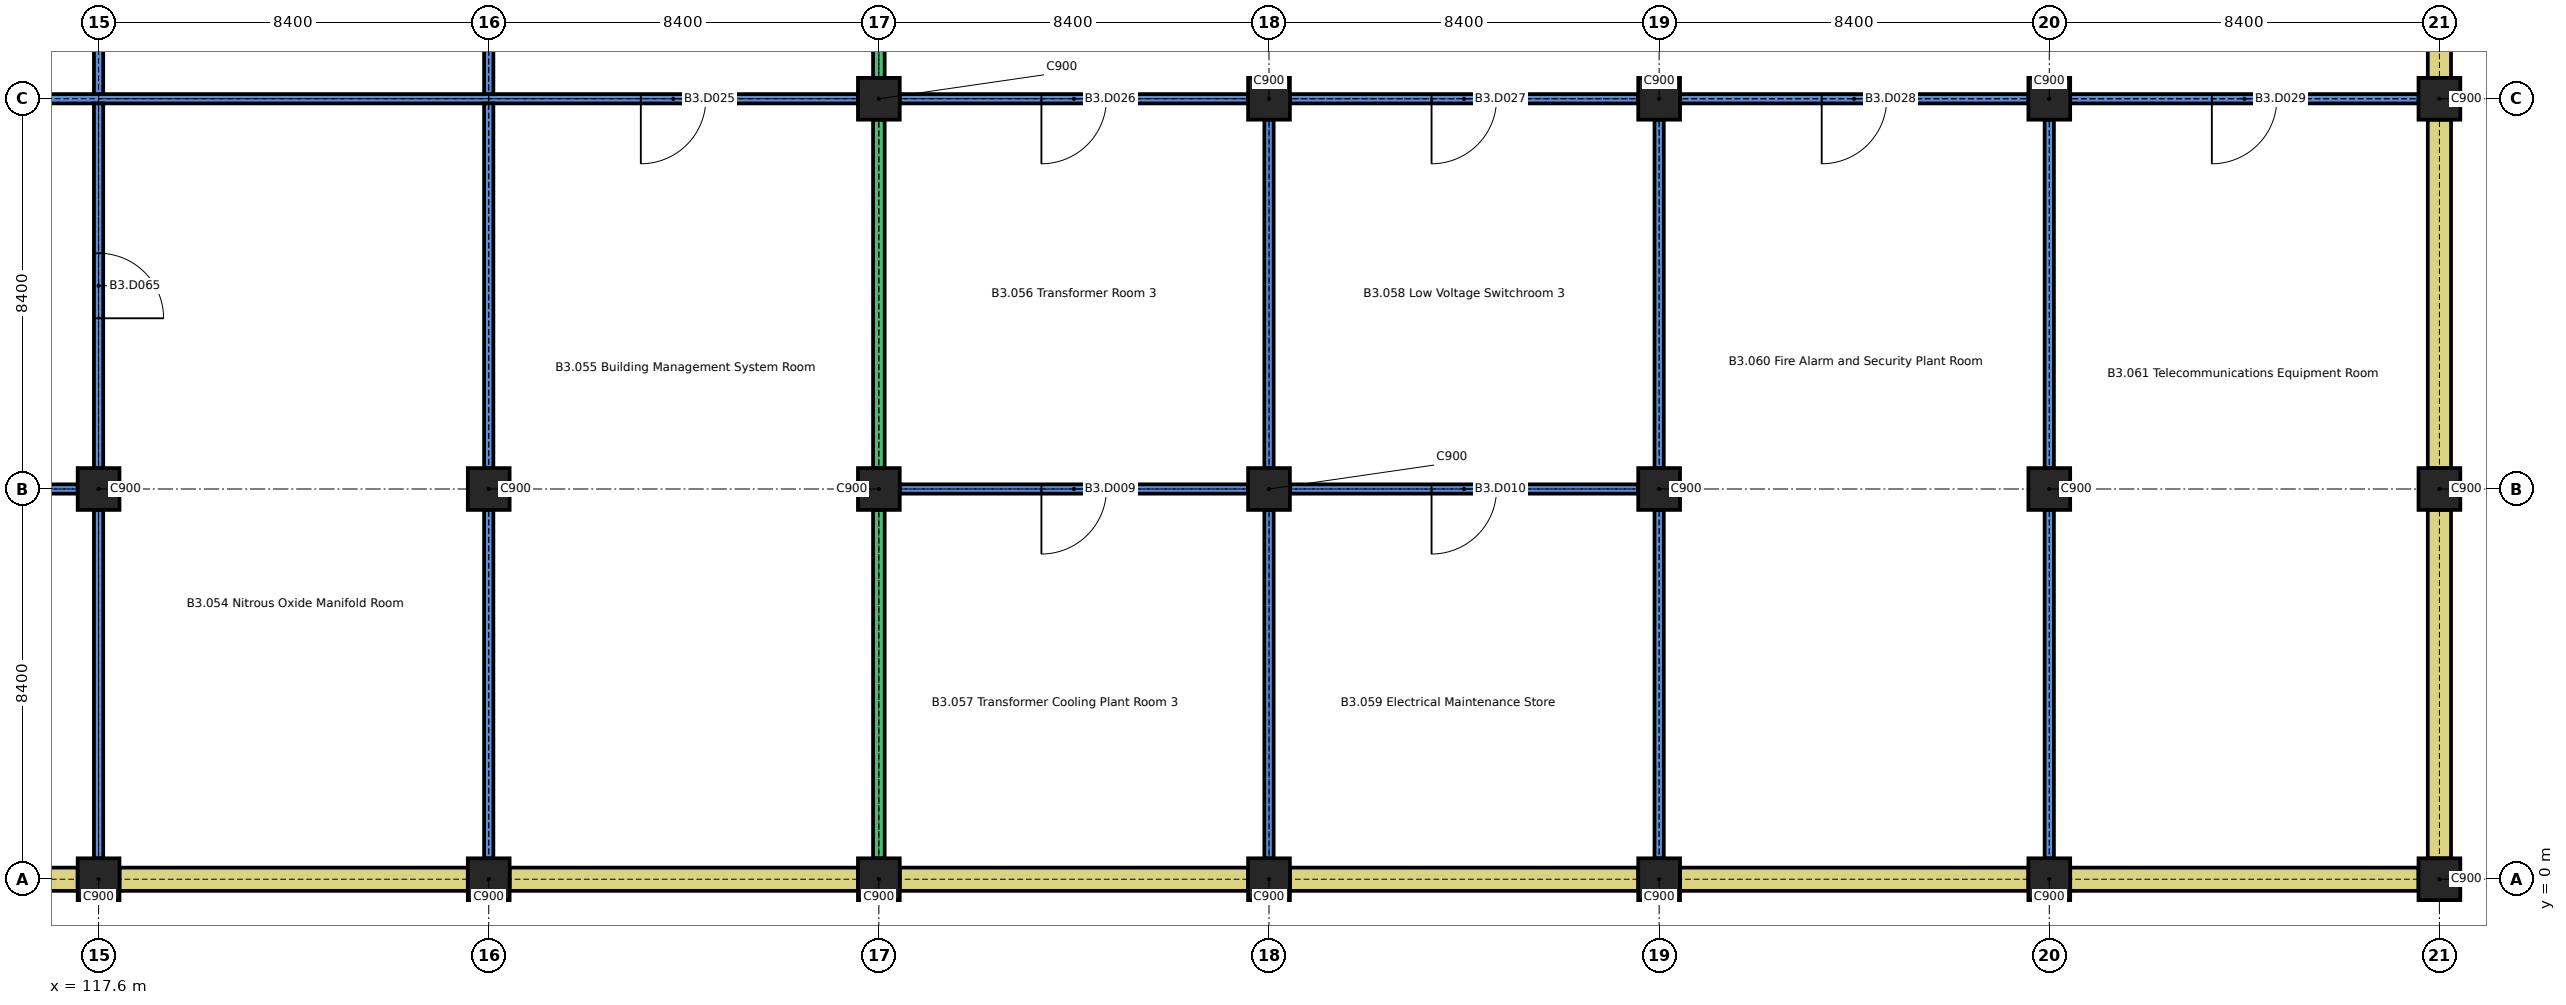
"""IFC4 building model, lengths in metres.
Left out: names, types, materials, properties, quantities, classifications, styles, units other than length and angle.
Written with IfcOpenShell. Run it as: python <this file> out.ifc"""

import sys

from ifc_helpers import new_model, si_unit, direction, frame, frame_2d, origin, origin_2d, place, context, subcontext, project, spatial, rectangle, extrude, element, fill, save


model = new_model("IFC4")
c1 = context("Model", 3, precision=1e-05, world=origin(), true_north=direction((0.0, 1.0)))
c2 = subcontext(c1, "Body", "Model", "MODEL_VIEW")
j1 = project(units=[si_unit("LENGTHUNIT", "METRE"), si_unit("PLANEANGLEUNIT", "RADIAN")], contexts=[c1])
p1 = place(None, origin())
s1 = spatial("IfcSite", under=j1, at=p1, CompositionType="ELEMENT")
p2 = place(p1, origin())
s2 = spatial("IfcBuilding", under=s1, at=p2, CompositionType="ELEMENT")
p3 = place(p2, frame((0.0, 0.0, -11.4)))
s3 = spatial("IfcBuildingStorey", under=s2, at=p3, CompositionType="ELEMENT", Elevation=-11.4)
for number, where, z_axis, x_axis in (
    (1, (117.6, 0.0, 0.0), (0.0, 0.0, 1.0), (1.0, 0.0, 0.0)),
    (2, (126.0, 0.0, 0.0), (0.0, 0.0, 1.0), (1.0, 0.0, 0.0)),
    (3, (134.4, 0.0, 0.0), (0.0, 0.0, 1.0), (1.0, 0.0, 0.0)),
    (4, (142.8, 0.0, 0.0), (0.0, 0.0, 1.0), (1.0, 0.0, 0.0)),
    (5, (151.2, 0.0, 0.0), (0.0, 0.0, 1.0), (1.0, 0.0, 0.0)),
    (6, (159.6, 0.0, 0.0), (0.0, 0.0, 1.0), (1.0, 0.0, 0.0)),
    (7, (168.0, 0.0, 0.0), (0.0, 0.0, 1.0), (1.0, 0.0, 0.0)),
    (8, (117.6, 8.4, 0.0), (0.0, 0.0, 1.0), (1.0, 0.0, 0.0)),
    (9, (126.0, 8.4, 0.0), (0.0, 0.0, 1.0), (1.0, 0.0, 0.0)),
    (10, (134.4, 8.4, 0.0), (0.0, 0.0, 1.0), (1.0, 0.0, 0.0)),
    (11, (142.8, 8.4, 0.0), (0.0, 0.0, 1.0), (1.0, 0.0, 0.0)),
    (12, (151.2, 8.4, 0.0), (0.0, 0.0, 1.0), (1.0, 0.0, 0.0)),
    (13, (159.6, 8.4, 0.0), (0.0, 0.0, 1.0), (1.0, 0.0, 0.0)),
    (14, (168.0, 8.4, 0.0), (0.0, 0.0, 1.0), (1.0, 0.0, 0.0)),
    (15, (134.4, 16.8, 0.0), (0.0, 0.0, 1.0), (1.0, 0.0, 0.0)),
    (16, (142.8, 16.8, 0.0), (0.0, 0.0, 1.0), (1.0, 0.0, 0.0)),
    (17, (151.2, 16.8, 0.0), (0.0, 0.0, 1.0), (1.0, 0.0, 0.0)),
    (18, (159.6, 16.8, 0.0), (0.0, 0.0, 1.0), (1.0, 0.0, 0.0)),
    (19, (168.0, 16.8, 0.0), (0.0, 0.0, 1.0), (1.0, 0.0, 0.0)),
):
    element("IfcColumn", number, at=place(p3, frame(where, z_axis=z_axis, x_axis=x_axis)), inside=s3, PredefinedType="COLUMN", context=c2, shape_type="SweptSolid", body=[
        extrude(rectangle(XDim=0.9, YDim=0.9, at=origin_2d()), origin(), (0.0, 0.0, 1.0), 3.2),
    ])
for number, where, z_axis, x_axis in (
    (20, (109.65, 0.0, 0.0), (0.0, 0.0, 1.0), (1.0, 0.0, 0.0)),
    (21, (118.05, 0.0, 0.0), (0.0, 0.0, 1.0), (1.0, 0.0, 0.0)),
    (22, (126.45, 0.0, 0.0), (0.0, 0.0, 1.0), (1.0, 0.0, 0.0)),
    (23, (134.85, 0.0, 0.0), (0.0, 0.0, 1.0), (1.0, 0.0, 0.0)),
    (24, (143.25, 0.0, 0.0), (0.0, 0.0, 1.0), (1.0, 0.0, 0.0)),
    (25, (151.65, 0.0, 0.0), (0.0, 0.0, 1.0), (1.0, 0.0, 0.0)),
    (26, (160.05, 0.0, 0.0), (0.0, 0.0, 1.0), (1.0, 0.0, 0.0)),
    (27, (168.0, 0.45, 0.0), (0.0, 0.0, 1.0), (0.0, 1.0, 0.0)),
    (28, (168.0, 8.85, 0.0), (0.0, 0.0, 1.0), (0.0, 1.0, 0.0)),
):
    element("IfcWall", number, at=place(p3, frame(where, z_axis=z_axis, x_axis=x_axis)), inside=s3, PredefinedType="SOLIDWALL", context=c2, shape_type="SweptSolid", body=[
        extrude(rectangle(XDim=7.5, YDim=0.5, at=frame_2d((3.75, 0.0))), origin(), (0.0, 0.0, 1.0), 3.2),
    ])
p4 = place(p3, frame((168.0, 17.25, 0.0), z_axis=(0.0, 0.0, 1.0), x_axis=(0.0, 1.0, 0.0)))
e29 = element("IfcWall", 29, at=p4, inside=s3, PredefinedType="SOLIDWALL", context=c2, shape_type="SweptSolid", body=[
    extrude(rectangle(XDim=16.6, YDim=0.5, at=frame_2d((8.3, 0.0))), origin(), (0.0, 0.0, 1.0), 3.2),
])
p5 = place(p3, frame((109.65, 8.4, 0.0), z_axis=(0.0, 0.0, 1.0), x_axis=(1.0, 0.0, 0.0)))
e30 = element("IfcWall", 30, at=p5, inside=s3, PredefinedType="PARTITIONING", context=c2, shape_type="SweptSolid", body=[
    extrude(rectangle(XDim=7.5, YDim=0.2, at=frame_2d((3.75, 0.0))), origin(), (0.0, 0.0, 1.0), 3.2),
])
p6 = place(p5, frame((3.05, 0.0, 0.0)))
e31 = element("IfcOpeningElement", 31, at=p6, cuts=e30, PredefinedType="OPENING", context=c2, shape_type="SweptSolid", body=[
    extrude(rectangle(XDim=1.4, YDim=2.1, at=frame_2d((0.7, 1.05))), frame((0.0, 0.11, 0.0), z_axis=(0.0, -1.0, 0.0), x_axis=(1.0, 0.0, 0.0)), (0.0, 0.0, 1.0), 0.22),
])
p7 = place(p3, frame((134.85, 8.4, 0.0), z_axis=(0.0, 0.0, 1.0), x_axis=(1.0, 0.0, 0.0)))
e32 = element("IfcWall", 32, at=p7, inside=s3, PredefinedType="PARTITIONING", context=c2, shape_type="SweptSolid", body=[
    extrude(rectangle(XDim=7.5, YDim=0.2, at=frame_2d((3.75, 0.0))), origin(), (0.0, 0.0, 1.0), 3.2),
])
p8 = place(p7, frame((3.05, 0.0, 0.0)))
e33 = element("IfcOpeningElement", 33, at=p8, cuts=e32, PredefinedType="OPENING", context=c2, shape_type="SweptSolid", body=[
    extrude(rectangle(XDim=1.4, YDim=2.1, at=frame_2d((0.7, 1.05))), frame((0.0, 0.11, 0.0), z_axis=(0.0, -1.0, 0.0), x_axis=(1.0, 0.0, 0.0)), (0.0, 0.0, 1.0), 0.22),
])
p9 = place(p3, frame((143.25, 8.4, 0.0), z_axis=(0.0, 0.0, 1.0), x_axis=(1.0, 0.0, 0.0)))
e34 = element("IfcWall", 34, at=p9, inside=s3, PredefinedType="PARTITIONING", context=c2, shape_type="SweptSolid", body=[
    extrude(rectangle(XDim=7.5, YDim=0.2, at=frame_2d((3.75, 0.0))), origin(), (0.0, 0.0, 1.0), 3.2),
])
p10 = place(p9, frame((3.05, 0.0, 0.0)))
e35 = element("IfcOpeningElement", 35, at=p10, cuts=e34, PredefinedType="OPENING", context=c2, shape_type="SweptSolid", body=[
    extrude(rectangle(XDim=1.4, YDim=2.1, at=frame_2d((0.7, 1.05))), frame((0.0, 0.11, 0.0), z_axis=(0.0, -1.0, 0.0), x_axis=(1.0, 0.0, 0.0)), (0.0, 0.0, 1.0), 0.22),
])
p11 = place(p3, frame((109.65, 16.8, 0.0), z_axis=(0.0, 0.0, 1.0), x_axis=(1.0, 0.0, 0.0)))
e36 = element("IfcWall", 36, at=p11, inside=s3, PredefinedType="PARTITIONING", context=c2, shape_type="SweptSolid", body=[
    extrude(rectangle(XDim=24.3, YDim=0.2, at=frame_2d((12.15, 0.0))), origin(), (0.0, 0.0, 1.0), 3.2),
])
p12 = place(p11, frame((3.275, 0.0, 0.0)))
e37 = element("IfcOpeningElement", 37, at=p12, cuts=e36, PredefinedType="OPENING", context=c2, shape_type="SweptSolid", body=[
    extrude(rectangle(XDim=1.4, YDim=2.1, at=frame_2d((0.7, 1.05))), frame((0.0, 0.11, 0.0), z_axis=(0.0, -1.0, 0.0), x_axis=(1.0, 0.0, 0.0)), (0.0, 0.0, 1.0), 0.22),
])
p13 = place(p11, frame((19.625, 0.0, 0.0)))
e38 = element("IfcOpeningElement", 38, at=p13, cuts=e36, PredefinedType="OPENING", context=c2, shape_type="SweptSolid", body=[
    extrude(rectangle(XDim=1.4, YDim=2.1, at=frame_2d((0.7, 1.05))), frame((0.0, 0.11, 0.0), z_axis=(0.0, -1.0, 0.0), x_axis=(1.0, 0.0, 0.0)), (0.0, 0.0, 1.0), 0.22),
])
p14 = place(p3, frame((134.85, 16.8, 0.0), z_axis=(0.0, 0.0, 1.0), x_axis=(1.0, 0.0, 0.0)))
e39 = element("IfcWall", 39, at=p14, inside=s3, PredefinedType="PARTITIONING", context=c2, shape_type="SweptSolid", body=[
    extrude(rectangle(XDim=7.5, YDim=0.2, at=frame_2d((3.75, 0.0))), origin(), (0.0, 0.0, 1.0), 3.2),
])
p15 = place(p14, frame((3.05, 0.0, 0.0)))
e40 = element("IfcOpeningElement", 40, at=p15, cuts=e39, PredefinedType="OPENING", context=c2, shape_type="SweptSolid", body=[
    extrude(rectangle(XDim=1.4, YDim=2.1, at=frame_2d((0.7, 1.05))), frame((0.0, 0.11, 0.0), z_axis=(0.0, -1.0, 0.0), x_axis=(1.0, 0.0, 0.0)), (0.0, 0.0, 1.0), 0.22),
])
p16 = place(p3, frame((143.25, 16.8, 0.0), z_axis=(0.0, 0.0, 1.0), x_axis=(1.0, 0.0, 0.0)))
e41 = element("IfcWall", 41, at=p16, inside=s3, PredefinedType="PARTITIONING", context=c2, shape_type="SweptSolid", body=[
    extrude(rectangle(XDim=7.5, YDim=0.2, at=frame_2d((3.75, 0.0))), origin(), (0.0, 0.0, 1.0), 3.2),
])
p17 = place(p16, frame((3.05, 0.0, 0.0)))
e42 = element("IfcOpeningElement", 42, at=p17, cuts=e41, PredefinedType="OPENING", context=c2, shape_type="SweptSolid", body=[
    extrude(rectangle(XDim=1.4, YDim=2.1, at=frame_2d((0.7, 1.05))), frame((0.0, 0.11, 0.0), z_axis=(0.0, -1.0, 0.0), x_axis=(1.0, 0.0, 0.0)), (0.0, 0.0, 1.0), 0.22),
])
p18 = place(p3, frame((151.65, 16.8, 0.0), z_axis=(0.0, 0.0, 1.0), x_axis=(1.0, 0.0, 0.0)))
e43 = element("IfcWall", 43, at=p18, inside=s3, PredefinedType="PARTITIONING", context=c2, shape_type="SweptSolid", body=[
    extrude(rectangle(XDim=7.5, YDim=0.2, at=frame_2d((3.75, 0.0))), origin(), (0.0, 0.0, 1.0), 3.2),
])
p19 = place(p18, frame((3.05, 0.0, 0.0)))
e44 = element("IfcOpeningElement", 44, at=p19, cuts=e43, PredefinedType="OPENING", context=c2, shape_type="SweptSolid", body=[
    extrude(rectangle(XDim=1.4, YDim=2.1, at=frame_2d((0.7, 1.05))), frame((0.0, 0.11, 0.0), z_axis=(0.0, -1.0, 0.0), x_axis=(1.0, 0.0, 0.0)), (0.0, 0.0, 1.0), 0.22),
])
p20 = place(p3, frame((160.05, 16.8, 0.0), z_axis=(0.0, 0.0, 1.0), x_axis=(1.0, 0.0, 0.0)))
e45 = element("IfcWall", 45, at=p20, inside=s3, PredefinedType="PARTITIONING", context=c2, shape_type="SweptSolid", body=[
    extrude(rectangle(XDim=7.5, YDim=0.2, at=frame_2d((3.75, 0.0))), origin(), (0.0, 0.0, 1.0), 3.2),
])
p21 = place(p20, frame((3.05, 0.0, 0.0)))
e46 = element("IfcOpeningElement", 46, at=p21, cuts=e45, PredefinedType="OPENING", context=c2, shape_type="SweptSolid", body=[
    extrude(rectangle(XDim=1.4, YDim=2.1, at=frame_2d((0.7, 1.05))), frame((0.0, 0.11, 0.0), z_axis=(0.0, -1.0, 0.0), x_axis=(1.0, 0.0, 0.0)), (0.0, 0.0, 1.0), 0.22),
])
p22 = place(p3, frame((117.6, 0.45, 0.0), z_axis=(0.0, 0.0, 1.0), x_axis=(0.0, 1.0, 0.0)))
e47 = element("IfcWall", 47, at=p22, inside=s3, PredefinedType="PARTITIONING", context=c2, shape_type="SweptSolid", body=[
    extrude(rectangle(XDim=7.5, YDim=0.2, at=frame_2d((3.75, 0.0))), origin(), (0.0, 0.0, 1.0), 3.2),
])
p23 = place(p3, frame((117.6, 8.85, 0.0), z_axis=(0.0, 0.0, 1.0), x_axis=(0.0, 1.0, 0.0)))
e48 = element("IfcWall", 48, at=p23, inside=s3, PredefinedType="PARTITIONING", context=c2, shape_type="SweptSolid", body=[
    extrude(rectangle(XDim=7.85, YDim=0.2, at=frame_2d((3.925, 0.0))), origin(), (0.0, 0.0, 1.0), 3.2),
])
p24 = place(p23, frame((3.225, 0.0, 0.0)))
e49 = element("IfcOpeningElement", 49, at=p24, cuts=e48, PredefinedType="OPENING", context=c2, shape_type="SweptSolid", body=[
    extrude(rectangle(XDim=1.4, YDim=2.1, at=frame_2d((0.7, 1.05))), frame((0.0, 0.11, 0.0), z_axis=(0.0, -1.0, 0.0), x_axis=(1.0, 0.0, 0.0)), (0.0, 0.0, 1.0), 0.22),
])
p25 = place(p3, frame((117.6, 16.9, 0.0), z_axis=(0.0, 0.0, 1.0), x_axis=(0.0, 1.0, 0.0)))
e50 = element("IfcWall", 50, at=p25, inside=s3, PredefinedType="PARTITIONING", context=c2, shape_type="SweptSolid", body=[
    extrude(rectangle(XDim=4.7, YDim=0.2, at=frame_2d((2.35, 0.0))), origin(), (0.0, 0.0, 1.0), 3.2),
])
p26 = place(p25, frame((1.35, 0.0, 0.0)))
e51 = element("IfcOpeningElement", 51, at=p26, cuts=e50, PredefinedType="OPENING", context=c2, shape_type="SweptSolid", body=[
    extrude(rectangle(XDim=2.0, YDim=2.4, at=frame_2d((1.0, 1.2))), frame((0.0, 0.11, 0.0), z_axis=(0.0, -1.0, 0.0), x_axis=(1.0, 0.0, 0.0)), (0.0, 0.0, 1.0), 0.22),
])
p27 = place(p3, frame((126.0, 0.45, 0.0), z_axis=(0.0, 0.0, 1.0), x_axis=(0.0, 1.0, 0.0)))
e52 = element("IfcWall", 52, at=p27, inside=s3, PredefinedType="PARTITIONING", context=c2, shape_type="SweptSolid", body=[
    extrude(rectangle(XDim=7.5, YDim=0.2, at=frame_2d((3.75, 0.0))), origin(), (0.0, 0.0, 1.0), 3.2),
])
p28 = place(p3, frame((126.0, 8.85, 0.0), z_axis=(0.0, 0.0, 1.0), x_axis=(0.0, 1.0, 0.0)))
e53 = element("IfcWall", 53, at=p28, inside=s3, PredefinedType="PARTITIONING", context=c2, shape_type="SweptSolid", body=[
    extrude(rectangle(XDim=7.85, YDim=0.2, at=frame_2d((3.925, 0.0))), origin(), (0.0, 0.0, 1.0), 3.2),
])
p29 = place(p3, frame((126.0, 16.9, 0.0), z_axis=(0.0, 0.0, 1.0), x_axis=(0.0, 1.0, 0.0)))
e54 = element("IfcWall", 54, at=p29, inside=s3, PredefinedType="PARTITIONING", context=c2, shape_type="SweptSolid", body=[
    extrude(rectangle(XDim=4.5, YDim=0.2, at=frame_2d((2.25, 0.0))), origin(), (0.0, 0.0, 1.0), 3.2),
])
p30 = place(p29, frame((1.25, 0.0, 0.0)))
e55 = element("IfcOpeningElement", 55, at=p30, cuts=e54, PredefinedType="OPENING", context=c2, shape_type="SweptSolid", body=[
    extrude(rectangle(XDim=2.0, YDim=2.4, at=frame_2d((1.0, 1.2))), frame((0.0, 0.11, 0.0), z_axis=(0.0, -1.0, 0.0), x_axis=(1.0, 0.0, 0.0)), (0.0, 0.0, 1.0), 0.22),
])
for number, where, z_axis, x_axis in (
    (56, (134.4, 0.45, 0.0), (0.0, 0.0, 1.0), (0.0, 1.0, 0.0)),
    (57, (134.4, 8.85, 0.0), (0.0, 0.0, 1.0), (0.0, 1.0, 0.0)),
):
    element("IfcWall", number, at=place(p3, frame(where, z_axis=z_axis, x_axis=x_axis)), inside=s3, PredefinedType="SOLIDWALL", context=c2, shape_type="SweptSolid", body=[
        extrude(rectangle(XDim=7.5, YDim=0.25, at=frame_2d((3.75, 0.0))), origin(), (0.0, 0.0, 1.0), 3.2),
    ])
p31 = place(p3, frame((134.4, 17.25, 0.0), z_axis=(0.0, 0.0, 1.0), x_axis=(0.0, 1.0, 0.0)))
e58 = element("IfcWall", 58, at=p31, inside=s3, PredefinedType="SOLIDWALL", context=c2, shape_type="SweptSolid", body=[
    extrude(rectangle(XDim=4.25, YDim=0.25, at=frame_2d((2.125, 0.0))), origin(), (0.0, 0.0, 1.0), 3.2),
])
p32 = place(p31, frame((1.425, 0.0, 0.0)))
e59 = element("IfcOpeningElement", 59, at=p32, cuts=e58, PredefinedType="OPENING", context=c2, shape_type="SweptSolid", body=[
    extrude(rectangle(XDim=1.4, YDim=2.1, at=frame_2d((0.7, 1.05))), frame((0.0, 0.135, 0.0), z_axis=(0.0, -1.0, 0.0), x_axis=(1.0, 0.0, 0.0)), (0.0, 0.0, 1.0), 0.27),
])
for number, where, z_axis, x_axis in (
    (60, (142.8, 0.45, 0.0), (0.0, 0.0, 1.0), (0.0, 1.0, 0.0)),
    (61, (142.8, 8.85, 0.0), (0.0, 0.0, 1.0), (0.0, 1.0, 0.0)),
    (62, (151.2, 0.45, 0.0), (0.0, 0.0, 1.0), (0.0, 1.0, 0.0)),
    (63, (151.2, 8.85, 0.0), (0.0, 0.0, 1.0), (0.0, 1.0, 0.0)),
    (64, (159.6, 0.45, 0.0), (0.0, 0.0, 1.0), (0.0, 1.0, 0.0)),
    (65, (159.6, 8.85, 0.0), (0.0, 0.0, 1.0), (0.0, 1.0, 0.0)),
):
    element("IfcWall", number, at=place(p3, frame(where, z_axis=z_axis, x_axis=x_axis)), inside=s3, PredefinedType="PARTITIONING", context=c2, shape_type="SweptSolid", body=[
        extrude(rectangle(XDim=7.5, YDim=0.2, at=frame_2d((3.75, 0.0))), origin(), (0.0, 0.0, 1.0), 3.2),
    ])
p33 = place(p8, origin())
e66 = element("IfcDoor", 66, at=p33, inside=s3, OperationType="SINGLE_SWING_LEFT", PredefinedType="DOOR", context=c2, shape_type="SweptSolid", body=[
    extrude(rectangle(XDim=1.4, YDim=2.1, at=frame_2d((0.7, 1.05))), frame((0.0, 0.025, 0.0), z_axis=(0.0, -1.0, 0.0), x_axis=(1.0, 0.0, 0.0)), (0.0, 0.0, 1.0), 0.05),
])
fill(e33, e66)
p34 = place(p10, origin())
e67 = element("IfcDoor", 67, at=p34, inside=s3, OperationType="SINGLE_SWING_LEFT", PredefinedType="DOOR", context=c2, shape_type="SweptSolid", body=[
    extrude(rectangle(XDim=1.4, YDim=2.1, at=frame_2d((0.7, 1.05))), frame((0.0, 0.025, 0.0), z_axis=(0.0, -1.0, 0.0), x_axis=(1.0, 0.0, 0.0)), (0.0, 0.0, 1.0), 0.05),
])
fill(e35, e67)
p35 = place(p13, origin())
e68 = element("IfcDoor", 68, at=p35, inside=s3, OperationType="SINGLE_SWING_LEFT", PredefinedType="DOOR", context=c2, shape_type="SweptSolid", body=[
    extrude(rectangle(XDim=1.4, YDim=2.1, at=frame_2d((0.7, 1.05))), frame((0.0, 0.025, 0.0), z_axis=(0.0, -1.0, 0.0), x_axis=(1.0, 0.0, 0.0)), (0.0, 0.0, 1.0), 0.05),
])
fill(e38, e68)
p36 = place(p15, origin())
e69 = element("IfcDoor", 69, at=p36, inside=s3, OperationType="SINGLE_SWING_LEFT", PredefinedType="DOOR", context=c2, shape_type="SweptSolid", body=[
    extrude(rectangle(XDim=1.4, YDim=2.1, at=frame_2d((0.7, 1.05))), frame((0.0, 0.025, 0.0), z_axis=(0.0, -1.0, 0.0), x_axis=(1.0, 0.0, 0.0)), (0.0, 0.0, 1.0), 0.05),
])
fill(e40, e69)
p37 = place(p17, origin())
e70 = element("IfcDoor", 70, at=p37, inside=s3, OperationType="SINGLE_SWING_LEFT", PredefinedType="DOOR", context=c2, shape_type="SweptSolid", body=[
    extrude(rectangle(XDim=1.4, YDim=2.1, at=frame_2d((0.7, 1.05))), frame((0.0, 0.025, 0.0), z_axis=(0.0, -1.0, 0.0), x_axis=(1.0, 0.0, 0.0)), (0.0, 0.0, 1.0), 0.05),
])
fill(e42, e70)
p38 = place(p19, origin())
e71 = element("IfcDoor", 71, at=p38, inside=s3, OperationType="SINGLE_SWING_LEFT", PredefinedType="DOOR", context=c2, shape_type="SweptSolid", body=[
    extrude(rectangle(XDim=1.4, YDim=2.1, at=frame_2d((0.7, 1.05))), frame((0.0, 0.025, 0.0), z_axis=(0.0, -1.0, 0.0), x_axis=(1.0, 0.0, 0.0)), (0.0, 0.0, 1.0), 0.05),
])
fill(e44, e71)
p39 = place(p21, origin())
e72 = element("IfcDoor", 72, at=p39, inside=s3, OperationType="SINGLE_SWING_LEFT", PredefinedType="DOOR", context=c2, shape_type="SweptSolid", body=[
    extrude(rectangle(XDim=1.4, YDim=2.1, at=frame_2d((0.7, 1.05))), frame((0.0, 0.025, 0.0), z_axis=(0.0, -1.0, 0.0), x_axis=(1.0, 0.0, 0.0)), (0.0, 0.0, 1.0), 0.05),
])
fill(e46, e72)
p40 = place(p24, origin())
e73 = element("IfcDoor", 73, at=p40, inside=s3, OperationType="SINGLE_SWING_LEFT", PredefinedType="DOOR", context=c2, shape_type="SweptSolid", body=[
    extrude(rectangle(XDim=1.4, YDim=2.1, at=frame_2d((0.7, 1.05))), frame((0.0, 0.025, 0.0), z_axis=(0.0, -1.0, 0.0), x_axis=(1.0, 0.0, 0.0)), (0.0, 0.0, 1.0), 0.05),
])
fill(e49, e73)
save(model, sys.argv[1])
